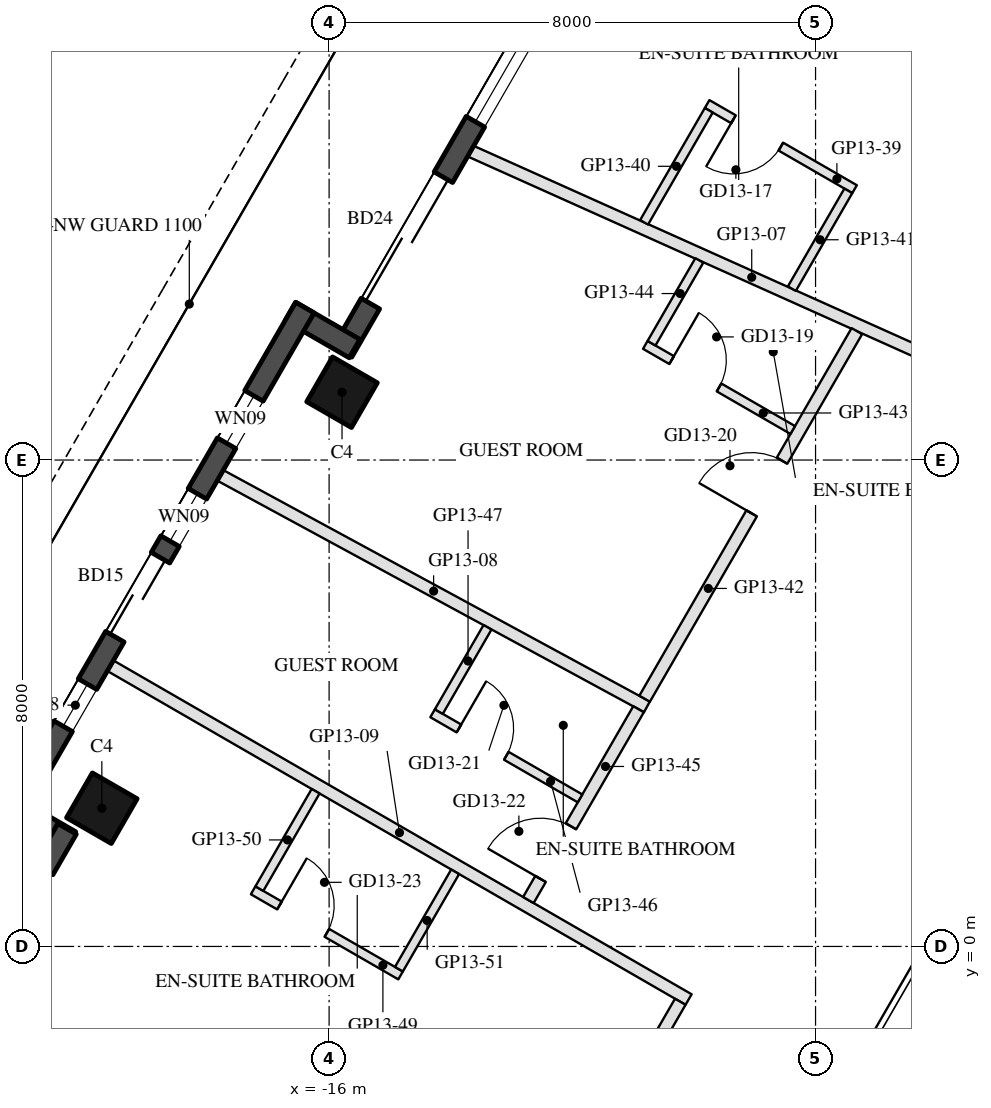
"""IFC4 building model, lengths in metres.
Left out: names, types, materials, properties, quantities, classifications, styles, units other than length and angle.
Written with IfcOpenShell. Run it as: python <this file> out.ifc"""

import sys

from ifc_helpers import new_model, si_unit, direction, frame, frame_2d, origin, origin_2d, place, context, subcontext, project, spatial, rectangle, hollow_rectangle, extrude, element, fill, save


model = new_model("IFC4")
c1 = context("Model", 3, precision=1e-05, world=origin(), true_north=direction((0.0, 1.0)))
c2 = subcontext(c1, "Body", "Model", "MODEL_VIEW")
j1 = project(units=[si_unit("LENGTHUNIT", "METRE"), si_unit("PLANEANGLEUNIT", "RADIAN")], contexts=[c1])
p1 = place(None, origin())
s1 = spatial("IfcSite", under=j1, at=p1, CompositionType="ELEMENT")
p2 = place(p1, origin())
s2 = spatial("IfcBuilding", under=s1, at=p2, CompositionType="ELEMENT")
p3 = place(p2, frame((0.0, 0.0, 154.0)))
s3 = spatial("IfcBuildingStorey", under=s2, at=p3, CompositionType="ELEMENT", Elevation=154.0)
for number, where, z_axis, x_axis in (
    (1, (-15.788, 9.115, 0.0), (0.0, 0.0, 1.0), (0.5, 0.866, 0.0)),
    (2, (-19.738, 2.273, 0.0), (0.0, 0.0, 1.0), (0.5, 0.866, 0.0)),
):
    element("IfcColumn", number, at=place(p3, frame(where, z_axis=z_axis, x_axis=x_axis)), inside=s3, PredefinedType="COLUMN", context=c2, shape_type="SweptSolid", body=[
        extrude(hollow_rectangle(XDim=0.85, YDim=0.85, WallThickness=0.04, at=origin_2d()), origin(), (0.0, 0.0, 1.0), 3.7),
    ])
p4 = place(p3, frame((-12.409, 15.617, 0.0), z_axis=(0.0, 0.0, 1.0), x_axis=(-0.500003597184, -0.866023326939, 0.0)))
e3 = element("IfcWall", 3, at=p4, inside=s3, PredefinedType="SOLIDWALL", context=c2, shape_type="SweptSolid", body=[
    extrude(rectangle(XDim=6.74, YDim=0.35, at=frame_2d((3.37, 0.0))), origin(), (0.0, 0.0, 1.0), 3.55),
])
p5 = place(p4, frame((0.77, 0.0, 0.3)))
e4 = element("IfcOpeningElement", 4, at=p5, cuts=e3, PredefinedType="OPENING", context=c2, shape_type="SweptSolid", body=[
    extrude(rectangle(XDim=1.6, YDim=2.65, at=frame_2d((0.8, 1.325))), frame((0.0, 0.185, 0.0), z_axis=(0.0, -1.0, 0.0), x_axis=(1.0, 0.0, 0.0)), (0.0, 0.0, 1.0), 0.37),
])
p6 = place(p4, frame((3.424, 0.0, 0.0)))
e5 = element("IfcOpeningElement", 5, at=p6, cuts=e3, PredefinedType="OPENING", context=c2, shape_type="SweptSolid", body=[
    extrude(rectangle(XDim=2.4, YDim=2.4, at=frame_2d((1.2, 1.2))), frame((0.0, 0.185, 0.0), z_axis=(0.0, -1.0, 0.0), x_axis=(1.0, 0.0, 0.0)), (0.0, 0.0, 1.0), 0.37),
])
p7 = place(p3, frame((-15.581, 9.833, 0.0), z_axis=(0.0, 0.0, 1.0), x_axis=(-0.866055662726, 0.499947586314, 0.0)))
e6 = element("IfcWall", 6, at=p7, inside=s3, PredefinedType="SOLIDWALL", context=c2, shape_type="SweptSolid", body=[
    extrude(rectangle(XDim=1.22, YDim=0.35, at=frame_2d((0.61, 0.0))), origin(), (0.0, 0.0, 1.0), 3.55),
])
p8 = place(p3, frame((-16.398, 10.507, 0.0), z_axis=(0.0, 0.0, 1.0), x_axis=(-0.499999142773, -0.866025898704, 0.0)))
e7 = element("IfcWall", 7, at=p8, inside=s3, PredefinedType="SOLIDWALL", context=c2, shape_type="SweptSolid", body=[
    extrude(rectangle(XDim=9.7, YDim=0.35, at=frame_2d((4.85, 0.0))), origin(), (0.0, 0.0, 1.0), 3.55),
])
p9 = place(p8, frame((1.675, 0.0, 0.3)))
e8 = element("IfcOpeningElement", 8, at=p9, cuts=e7, PredefinedType="OPENING", context=c2, shape_type="SweptSolid", body=[
    extrude(rectangle(XDim=0.9, YDim=2.65, at=frame_2d((0.45, 1.325))), frame((0.0, 0.185, 0.0), z_axis=(0.0, -1.0, 0.0), x_axis=(1.0, 0.0, 0.0)), (0.0, 0.0, 1.0), 0.37),
])
p10 = place(p8, frame((4.75, 0.0, 0.0)))
e9 = element("IfcOpeningElement", 9, at=p10, cuts=e7, PredefinedType="OPENING", context=c2, shape_type="SweptSolid", body=[
    extrude(rectangle(XDim=1.5, YDim=2.4, at=frame_2d((0.75, 1.2))), frame((0.0, 0.185, 0.0), z_axis=(0.0, -1.0, 0.0), x_axis=(1.0, 0.0, 0.0)), (0.0, 0.0, 1.0), 0.37),
])
p11 = place(p8, frame((3.535, 0.0, 0.3)))
e10 = element("IfcOpeningElement", 10, at=p11, cuts=e7, PredefinedType="OPENING", context=c2, shape_type="SweptSolid", body=[
    extrude(rectangle(XDim=0.9, YDim=2.65, at=frame_2d((0.45, 1.325))), frame((0.0, 0.185, 0.0), z_axis=(0.0, -1.0, 0.0), x_axis=(1.0, 0.0, 0.0)), (0.0, 0.0, 1.0), 0.37),
])
p12 = place(p8, frame((7.15, 0.0, 0.3)))
e11 = element("IfcOpeningElement", 11, at=p12, cuts=e7, PredefinedType="OPENING", context=c2, shape_type="SweptSolid", body=[
    extrude(rectangle(XDim=0.8, YDim=2.65, at=frame_2d((0.4, 1.325))), frame((0.0, 0.185, 0.0), z_axis=(0.0, -1.0, 0.0), x_axis=(1.0, 0.0, 0.0)), (0.0, 0.0, 1.0), 0.37),
])
p13 = place(p3, frame((-21.312, 2.346, 0.0), z_axis=(0.0, 0.0, 1.0), x_axis=(0.866005645448, -0.500034220881, 0.0)))
e12 = element("IfcWall", 12, at=p13, inside=s3, PredefinedType="SOLIDWALL", context=c2, shape_type="SweptSolid", body=[
    extrude(rectangle(XDim=1.22, YDim=0.35, at=frame_2d((0.61, 0.0))), origin(), (0.0, 0.0, 1.0), 3.55),
])
p14 = place(p3, frame((-20.309, 1.934, 0.0), z_axis=(0.0, 0.0, 1.0), x_axis=(-0.499992114976, -0.866029956157, 0.0)))
e13 = element("IfcWall", 13, at=p14, inside=s3, PredefinedType="SOLIDWALL", context=c2, shape_type="SweptSolid", body=[
    extrude(rectangle(XDim=6.74, YDim=0.35, at=frame_2d((3.37, 0.0))), origin(), (0.0, 0.0, 1.0), 3.55),
])
p15 = place(p14, frame((0.77, 0.0, 0.0)))
e14 = element("IfcOpeningElement", 14, at=p15, cuts=e13, PredefinedType="OPENING", context=c2, shape_type="SweptSolid", body=[
    extrude(rectangle(XDim=2.4, YDim=2.4, at=frame_2d((1.2, 1.2))), frame((0.0, 0.185, 0.0), z_axis=(0.0, -1.0, 0.0), x_axis=(1.0, 0.0, 0.0)), (0.0, 0.0, 1.0), 0.37),
])
p16 = place(p14, frame((3.47, 0.0, 0.3)))
e15 = element("IfcOpeningElement", 15, at=p16, cuts=e13, PredefinedType="OPENING", context=c2, shape_type="SweptSolid", body=[
    extrude(rectangle(XDim=2.9, YDim=2.65, at=frame_2d((1.45, 1.325))), frame((0.0, 0.185, 0.0), z_axis=(0.0, -1.0, 0.0), x_axis=(1.0, 0.0, 0.0)), (0.0, 0.0, 1.0), 0.37),
])
p17 = place(p3, frame((-13.672, 13.08, 0.0), z_axis=(0.0, 0.0, 1.0), x_axis=(0.912311972773, -0.409495866077, 0.0)))
e16 = element("IfcWall", 16, at=p17, inside=s3, PredefinedType="PARTITIONING", context=c2, shape_type="SweptSolid", body=[
    extrude(rectangle(XDim=10.132, YDim=0.2, at=frame_2d((5.066, 0.0))), origin(), (0.0, 0.0, 1.0), 3.06),
])
p18 = place(p3, frame((-17.79, 7.748, 0.0), z_axis=(0.0, 0.0, 1.0), x_axis=(0.878932558121, -0.476946074808, 0.0)))
e17 = element("IfcWall", 17, at=p18, inside=s3, PredefinedType="PARTITIONING", context=c2, shape_type="SweptSolid", body=[
    extrude(rectangle(XDim=7.983, YDim=0.2, at=frame_2d((3.991, 0.0))), origin(), (0.0, 0.0, 1.0), 3.06),
])
p19 = place(p3, frame((-19.597, 4.617, 0.0), z_axis=(0.0, 0.0, 1.0), x_axis=(0.866027479907, -0.499996404033, 0.0)))
e18 = element("IfcWall", 18, at=p19, inside=s3, PredefinedType="PARTITIONING", context=c2, shape_type="SweptSolid", body=[
    extrude(rectangle(XDim=10.98, YDim=0.2, at=frame_2d((5.49, 0.0))), origin(), (0.0, 0.0, 1.0), 3.06),
])
p20 = place(p3, frame((-7.358, 12.455, 0.0), z_axis=(0.0, 0.0, 1.0), x_axis=(-0.866034573852, 0.49998411664, 0.0)))
e19 = element("IfcWall", 19, at=p20, inside=s3, PredefinedType="PARTITIONING", context=c2, shape_type="SweptSolid", body=[
    extrude(rectangle(XDim=2.8, YDim=0.15, at=frame_2d((1.4, 0.0))), origin(), (0.0, 0.0, 1.0), 3.55),
])
p21 = place(p20, frame((1.4, 0.0, 0.0)))
e20 = element("IfcOpeningElement", 20, at=p21, cuts=e19, PredefinedType="OPENING", context=c2, shape_type="SweptSolid", body=[
    extrude(rectangle(XDim=0.9, YDim=2.1, at=frame_2d((0.45, 1.05))), frame((0.0, 0.085, 0.0), z_axis=(0.0, -1.0, 0.0), x_axis=(1.0, 0.0, 0.0)), (0.0, 0.0, 1.0), 0.17),
])
p22 = place(p3, frame((-9.756, 13.752, 0.0), z_axis=(0.0, 0.0, 1.0), x_axis=(-0.50001378257, -0.866017446268, 0.0)))
e21 = element("IfcWall", 21, at=p22, inside=s3, PredefinedType="PARTITIONING", context=c2, shape_type="SweptSolid", body=[
    extrude(rectangle(XDim=2.128, YDim=0.15, at=frame_2d((1.064, 0.0))), origin(), (0.0, 0.0, 1.0), 3.55),
])
p23 = place(p3, frame((-7.461, 12.427, 0.0), z_axis=(0.0, 0.0, 1.0), x_axis=(-0.500025795397, -0.866010510293, 0.0)))
e22 = element("IfcWall", 22, at=p23, inside=s3, PredefinedType="PARTITIONING", context=c2, shape_type="SweptSolid", body=[
    extrude(rectangle(XDim=1.858, YDim=0.15, at=frame_2d((0.929, 0.0))), origin(), (0.0, 0.0, 1.0), 3.55),
])
p24 = place(p3, frame((-10.811, 4.075, 0.0), z_axis=(0.0, 0.0, 1.0), x_axis=(0.500006032813, 0.86602192071, 0.0)))
e23 = element("IfcWall", 23, at=p24, inside=s3, PredefinedType="PARTITIONING", context=c2, shape_type="SweptSolid", body=[
    extrude(rectangle(XDim=6.98, YDim=0.2, at=frame_2d((3.49, 0.0))), origin(), (0.0, 0.0, 1.0), 2.95),
])
p25 = place(p24, frame((3.52, 0.0, 0.0)))
e24 = element("IfcOpeningElement", 24, at=p25, cuts=e23, PredefinedType="OPENING", context=c2, shape_type="SweptSolid", body=[
    extrude(rectangle(XDim=1.0, YDim=2.1, at=frame_2d((0.5, 1.05))), frame((0.0, 0.11, 0.0), z_axis=(0.0, -1.0, 0.0), x_axis=(1.0, 0.0, 0.0)), (0.0, 0.0, 1.0), 0.22),
])
p26 = place(p3, frame((-10.8, 9.894, 0.0), z_axis=(0.0, 0.0, 1.0), x_axis=(0.866056369097, -0.49994636267, 0.0)))
e25 = element("IfcWall", 25, at=p26, inside=s3, PredefinedType="PARTITIONING", context=c2, shape_type="SweptSolid", body=[
    extrude(rectangle(XDim=2.8, YDim=0.15, at=frame_2d((1.4, 0.0))), origin(), (0.0, 0.0, 1.0), 3.55),
])
p27 = place(p26, frame((0.5, 0.0, 0.0)))
e26 = element("IfcOpeningElement", 26, at=p27, cuts=e25, PredefinedType="OPENING", context=c2, shape_type="SweptSolid", body=[
    extrude(rectangle(XDim=0.9, YDim=2.1, at=frame_2d((0.45, 1.05))), frame((0.0, 0.085, 0.0), z_axis=(0.0, -1.0, 0.0), x_axis=(1.0, 0.0, 0.0)), (0.0, 0.0, 1.0), 0.17),
])
p28 = place(p3, frame((-9.912, 11.283, 0.0), z_axis=(0.0, 0.0, 1.0), x_axis=(-0.499964459118, -0.86604592235, 0.0)))
e27 = element("IfcWall", 27, at=p28, inside=s3, PredefinedType="PARTITIONING", context=c2, shape_type="SweptSolid", body=[
    extrude(rectangle(XDim=1.572, YDim=0.15, at=frame_2d((0.786, 0.0))), origin(), (0.0, 0.0, 1.0), 2.95),
])
p29 = place(p3, frame((-12.723, 0.764, 0.0), z_axis=(0.0, 0.0, 1.0), x_axis=(0.500016018658, 0.86601615521, 0.0)))
e28 = element("IfcWall", 28, at=p29, inside=s3, PredefinedType="PARTITIONING", context=c2, shape_type="SweptSolid", body=[
    extrude(rectangle(XDim=3.624, YDim=0.2, at=frame_2d((1.812, 0.0))), origin(), (0.0, 0.0, 1.0), 2.95),
])
p30 = place(p29, frame((0.4, 0.0, 0.0)))
e29 = element("IfcOpeningElement", 29, at=p30, cuts=e28, PredefinedType="OPENING", context=c2, shape_type="SweptSolid", body=[
    extrude(rectangle(XDim=1.0, YDim=2.1, at=frame_2d((0.5, 1.05))), frame((0.0, 0.11, 0.0), z_axis=(0.0, -1.0, 0.0), x_axis=(1.0, 0.0, 0.0)), (0.0, 0.0, 1.0), 0.22),
])
p31 = place(p3, frame((-14.298, 3.835, 0.0), z_axis=(0.0, 0.0, 1.0), x_axis=(0.866056369097, -0.49994636267, 0.0)))
e30 = element("IfcWall", 30, at=p31, inside=s3, PredefinedType="PARTITIONING", context=c2, shape_type="SweptSolid", body=[
    extrude(rectangle(XDim=2.8, YDim=0.15, at=frame_2d((1.4, 0.0))), origin(), (0.0, 0.0, 1.0), 2.95),
])
p32 = place(p31, frame((0.5, 0.0, 0.0)))
e31 = element("IfcOpeningElement", 31, at=p32, cuts=e30, PredefinedType="OPENING", context=c2, shape_type="SweptSolid", body=[
    extrude(rectangle(XDim=0.9, YDim=2.1, at=frame_2d((0.45, 1.05))), frame((0.0, 0.085, 0.0), z_axis=(0.0, -1.0, 0.0), x_axis=(1.0, 0.0, 0.0)), (0.0, 0.0, 1.0), 0.17),
])
p33 = place(p3, frame((-13.395, 5.249, 0.0), z_axis=(0.0, 0.0, 1.0), x_axis=(-0.499960029081, -0.866048479775, 0.0)))
e32 = element("IfcWall", 32, at=p33, inside=s3, PredefinedType="PARTITIONING", context=c2, shape_type="SweptSolid", body=[
    extrude(rectangle(XDim=1.601, YDim=0.15, at=frame_2d((0.801, 0.0))), origin(), (0.0, 0.0, 1.0), 3.55),
])
p34 = place(p3, frame((-12.269, -4.45, 0.0), z_axis=(0.0, 0.0, 1.0), x_axis=(0.500011931275, 0.86601851515, 0.0)))
e33 = element("IfcWall", 33, at=p34, inside=s3, PredefinedType="PARTITIONING", context=c2, shape_type="SweptSolid", body=[
    extrude(rectangle(XDim=4.088, YDim=0.2, at=frame_2d((2.044, 0.0))), origin(), (0.0, 0.0, 1.0), 2.95),
])
p35 = place(p34, frame((1.544, 0.0, 0.0)))
e34 = element("IfcOpeningElement", 34, at=p35, cuts=e33, PredefinedType="OPENING", context=c2, shape_type="SweptSolid", body=[
    extrude(rectangle(XDim=1.0, YDim=2.1, at=frame_2d((0.5, 1.05))), frame((0.0, 0.11, 0.0), z_axis=(0.0, -1.0, 0.0), x_axis=(1.0, 0.0, 0.0)), (0.0, 0.0, 1.0), 0.22),
])
p36 = place(p3, frame((-17.249, 0.923, 0.0), z_axis=(0.0, 0.0, 1.0), x_axis=(0.866034573852, -0.49998411664, 0.0)))
e35 = element("IfcWall", 35, at=p36, inside=s3, PredefinedType="PARTITIONING", context=c2, shape_type="SweptSolid", body=[
    extrude(rectangle(XDim=2.8, YDim=0.15, at=frame_2d((1.4, 0.0))), origin(), (0.0, 0.0, 1.0), 2.95),
])
p37 = place(p36, frame((0.5, 0.0, 0.0)))
e36 = element("IfcOpeningElement", 36, at=p37, cuts=e35, PredefinedType="OPENING", context=c2, shape_type="SweptSolid", body=[
    extrude(rectangle(XDim=0.9, YDim=2.1, at=frame_2d((0.45, 1.05))), frame((0.0, 0.085, 0.0), z_axis=(0.0, -1.0, 0.0), x_axis=(1.0, 0.0, 0.0)), (0.0, 0.0, 1.0), 0.17),
])
for number, where, z_axis, x_axis in (
    (37, (-16.222, 2.553, 0.0), (0.0, 0.0, 1.0), (-0.5, -0.866, 0.0)),
    (38, (-13.927, 1.228, 0.0), (0.0, 0.0, 1.0), (-0.5, -0.866, 0.0)),
):
    element("IfcWall", number, at=place(p3, frame(where, z_axis=z_axis, x_axis=x_axis)), inside=s3, PredefinedType="PARTITIONING", context=c2, shape_type="SweptSolid", body=[
        extrude(rectangle(XDim=1.85, YDim=0.15, at=frame_2d((0.925, 0.0))), origin(), (0.0, 0.0, 1.0), 3.55),
    ])
p38 = place(p5, origin())
e39 = element("IfcWindow", 39, at=p38, inside=s3, PartitioningType="SINGLE_PANEL", PredefinedType="WINDOW", context=c2, shape_type="SweptSolid", body=[
    extrude(rectangle(XDim=1.6, YDim=2.65, at=frame_2d((0.8, 1.325))), frame((0.0, 0.03, 0.0), z_axis=(0.0, -1.0, 0.0), x_axis=(1.0, 0.0, 0.0)), (0.0, 0.0, 1.0), 0.06),
])
fill(e4, e39)
p39 = place(p6, frame((2.4, 0.0, 0.0), z_axis=(0.0, 0.0, 1.0), x_axis=(-1.0, 0.0, 0.0)))
e40 = element("IfcDoor", 40, at=p39, inside=s3, OperationType="SLIDING_TO_LEFT", PredefinedType="DOOR", context=c2, shape_type="SweptSolid", body=[
    extrude(rectangle(XDim=2.4, YDim=2.4, at=frame_2d((1.2, 1.2))), frame((0.0, 0.025, 0.0), z_axis=(0.0, -1.0, 0.0), x_axis=(1.0, 0.0, 0.0)), (0.0, 0.0, 1.0), 0.05),
])
fill(e5, e40)
p40 = place(p9, origin())
e41 = element("IfcWindow", 41, at=p40, inside=s3, PartitioningType="SINGLE_PANEL", PredefinedType="WINDOW", context=c2, shape_type="SweptSolid", body=[
    extrude(rectangle(XDim=0.9, YDim=2.65, at=frame_2d((0.45, 1.325))), frame((0.0, 0.03, 0.0), z_axis=(0.0, -1.0, 0.0), x_axis=(1.0, 0.0, 0.0)), (0.0, 0.0, 1.0), 0.06),
])
fill(e8, e41)
p41 = place(p10, frame((1.5, 0.0, 0.0), z_axis=(0.0, 0.0, 1.0), x_axis=(-1.0, 0.0, 0.0)))
e42 = element("IfcDoor", 42, at=p41, inside=s3, OperationType="SLIDING_TO_LEFT", PredefinedType="DOOR", context=c2, shape_type="SweptSolid", body=[
    extrude(rectangle(XDim=1.5, YDim=2.4, at=frame_2d((0.75, 1.2))), frame((0.0, 0.025, 0.0), z_axis=(0.0, -1.0, 0.0), x_axis=(1.0, 0.0, 0.0)), (0.0, 0.0, 1.0), 0.05),
])
fill(e9, e42)
p42 = place(p11, origin())
e43 = element("IfcWindow", 43, at=p42, inside=s3, PartitioningType="SINGLE_PANEL", PredefinedType="WINDOW", context=c2, shape_type="SweptSolid", body=[
    extrude(rectangle(XDim=0.9, YDim=2.65, at=frame_2d((0.45, 1.325))), frame((0.0, 0.03, 0.0), z_axis=(0.0, -1.0, 0.0), x_axis=(1.0, 0.0, 0.0)), (0.0, 0.0, 1.0), 0.06),
])
fill(e10, e43)
p43 = place(p12, origin())
e44 = element("IfcWindow", 44, at=p43, inside=s3, PartitioningType="SINGLE_PANEL", PredefinedType="WINDOW", context=c2, shape_type="SweptSolid", body=[
    extrude(rectangle(XDim=0.8, YDim=2.65, at=frame_2d((0.4, 1.325))), frame((0.0, 0.03, 0.0), z_axis=(0.0, -1.0, 0.0), x_axis=(1.0, 0.0, 0.0)), (0.0, 0.0, 1.0), 0.06),
])
fill(e11, e44)
p44 = place(p21, origin())
e45 = element("IfcDoor", 45, at=p44, inside=s3, OperationType="SINGLE_SWING_RIGHT", PredefinedType="DOOR", context=c2, shape_type="SweptSolid", body=[
    extrude(rectangle(XDim=0.9, YDim=2.1, at=frame_2d((0.45, 1.05))), frame((0.0, 0.025, 0.0), z_axis=(0.0, -1.0, 0.0), x_axis=(1.0, 0.0, 0.0)), (0.0, 0.0, 1.0), 0.05),
])
fill(e20, e45)
p45 = place(p27, origin())
e46 = element("IfcDoor", 46, at=p45, inside=s3, OperationType="SINGLE_SWING_LEFT", PredefinedType="DOOR", context=c2, shape_type="SweptSolid", body=[
    extrude(rectangle(XDim=0.9, YDim=2.1, at=frame_2d((0.45, 1.05))), frame((0.0, 0.025, 0.0), z_axis=(0.0, -1.0, 0.0), x_axis=(1.0, 0.0, 0.0)), (0.0, 0.0, 1.0), 0.05),
])
fill(e26, e46)
p46 = place(p25, origin())
e47 = element("IfcDoor", 47, at=p46, inside=s3, OperationType="SINGLE_SWING_LEFT", PredefinedType="DOOR", context=c2, shape_type="SweptSolid", body=[
    extrude(rectangle(XDim=1.0, YDim=2.1, at=frame_2d((0.5, 1.05))), frame((0.0, 0.025, 0.0), z_axis=(0.0, -1.0, 0.0), x_axis=(1.0, 0.0, 0.0)), (0.0, 0.0, 1.0), 0.05),
])
fill(e24, e47)
p47 = place(p32, origin())
e48 = element("IfcDoor", 48, at=p47, inside=s3, OperationType="SINGLE_SWING_LEFT", PredefinedType="DOOR", context=c2, shape_type="SweptSolid", body=[
    extrude(rectangle(XDim=0.9, YDim=2.1, at=frame_2d((0.45, 1.05))), frame((0.0, 0.025, 0.0), z_axis=(0.0, -1.0, 0.0), x_axis=(1.0, 0.0, 0.0)), (0.0, 0.0, 1.0), 0.05),
])
fill(e31, e48)
p48 = place(p30, origin())
e49 = element("IfcDoor", 49, at=p48, inside=s3, OperationType="SINGLE_SWING_LEFT", PredefinedType="DOOR", context=c2, shape_type="SweptSolid", body=[
    extrude(rectangle(XDim=1.0, YDim=2.1, at=frame_2d((0.5, 1.05))), frame((0.0, 0.025, 0.0), z_axis=(0.0, -1.0, 0.0), x_axis=(1.0, 0.0, 0.0)), (0.0, 0.0, 1.0), 0.05),
])
fill(e29, e49)
p49 = place(p37, origin())
e50 = element("IfcDoor", 50, at=p49, inside=s3, OperationType="SINGLE_SWING_LEFT", PredefinedType="DOOR", context=c2, shape_type="SweptSolid", body=[
    extrude(rectangle(XDim=0.9, YDim=2.1, at=frame_2d((0.45, 1.05))), frame((0.0, 0.025, 0.0), z_axis=(0.0, -1.0, 0.0), x_axis=(1.0, 0.0, 0.0)), (0.0, 0.0, 1.0), 0.05),
])
fill(e36, e50)
save(model, sys.argv[1])
